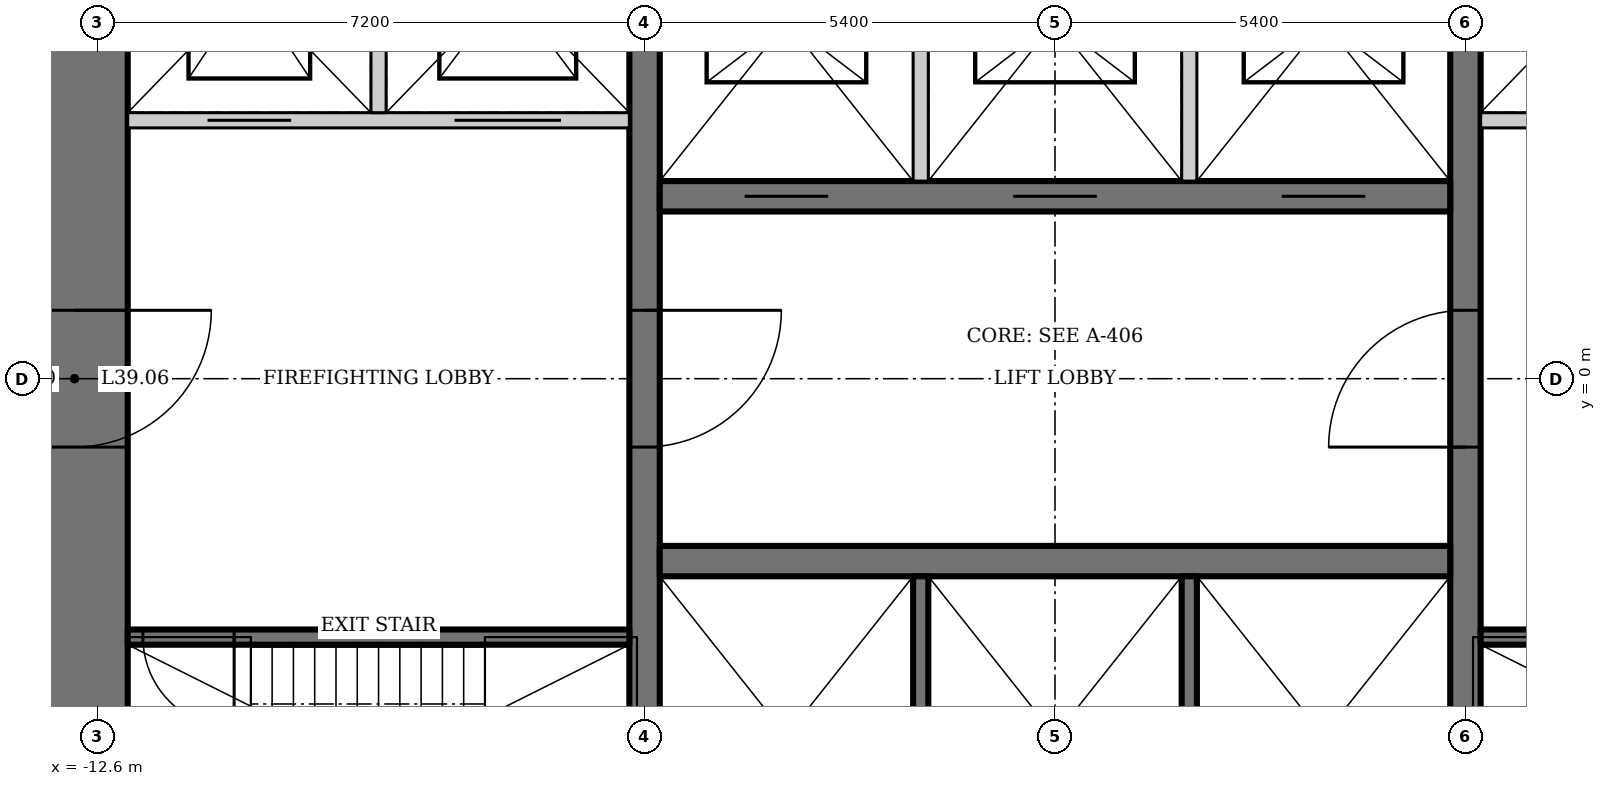
"""IFC4 building model, lengths in metres.
Left out: names, types, materials, properties, quantities, classifications, styles, units other than length and angle.
Written with IfcOpenShell. Run it as: python <this file> out.ifc"""

import sys

from ifc_helpers import new_model, si_unit, direction, frame, frame_2d, origin, place, context, subcontext, project, spatial, rectangle, extrude, element, fill, save


model = new_model("IFC4")
c1 = context("Model", 3, precision=1e-05, world=origin(), true_north=direction((0.0, 1.0)))
c2 = subcontext(c1, "Body", "Model", "MODEL_VIEW")
j1 = project(units=[si_unit("LENGTHUNIT", "METRE"), si_unit("PLANEANGLEUNIT", "RADIAN")], contexts=[c1])
p1 = place(None, origin())
s1 = spatial("IfcSite", under=j1, at=p1, CompositionType="ELEMENT")
p2 = place(p1, origin())
s2 = spatial("IfcBuilding", under=s1, at=p2, CompositionType="ELEMENT")
p3 = place(p2, frame((0.0, 0.0, 167.8)))
s3 = spatial("IfcBuildingStorey", under=s2, at=p3, CompositionType="ELEMENT", Elevation=167.8)
p4 = place(p3, frame((-12.9, 13.0, 0.0), z_axis=(0.0, 0.0, 1.0), x_axis=(0.0, -1.0, 0.0)))
e1 = element("IfcWall", 1, at=p4, inside=s3, PredefinedType="SHEAR", context=c2, shape_type="SweptSolid", body=[
    extrude(rectangle(XDim=26.0, YDim=1.4, at=frame_2d((13.0, 0.0))), origin(), (0.0, 0.0, 1.0), 4.2),
])
p5 = place(p4, frame((12.1, 0.0, 0.0)))
e2 = element("IfcOpeningElement", 2, at=p5, cuts=e1, PredefinedType="OPENING", context=c2, shape_type="SweptSolid", body=[
    extrude(rectangle(XDim=1.8, YDim=2.1, at=frame_2d((0.9, 1.05))), frame((0.0, 0.71, 0.0), z_axis=(0.0, -1.0, 0.0), x_axis=(1.0, 0.0, 0.0)), (0.0, 0.0, 1.0), 1.42),
])
p6 = place(p3, frame((5.4, -6.8, 0.0), z_axis=(0.0, 0.0, 1.0), x_axis=(0.0, 1.0, 0.0)))
e3 = element("IfcWall", 3, at=p6, inside=s3, PredefinedType="SHEAR", context=c2, shape_type="SweptSolid", body=[
    extrude(rectangle(XDim=13.6, YDim=0.4, at=frame_2d((6.8, 0.0))), origin(), (0.0, 0.0, 1.0), 4.2),
])
p7 = place(p6, frame((5.9, 0.0, 0.0)))
e4 = element("IfcOpeningElement", 4, at=p7, cuts=e3, PredefinedType="OPENING", context=c2, shape_type="SweptSolid", body=[
    extrude(rectangle(XDim=1.8, YDim=2.1, at=frame_2d((0.9, 1.05))), frame((0.0, 0.21, 0.0), z_axis=(0.0, -1.0, 0.0), x_axis=(1.0, 0.0, 0.0)), (0.0, 0.0, 1.0), 0.42),
])
p8 = place(p3, frame((-5.4, 6.8, 0.0), z_axis=(0.0, 0.0, 1.0), x_axis=(0.0, -1.0, 0.0)))
e5 = element("IfcWall", 5, at=p8, inside=s3, PredefinedType="SHEAR", context=c2, shape_type="SweptSolid", body=[
    extrude(rectangle(XDim=13.6, YDim=0.4, at=frame_2d((6.8, 0.0))), origin(), (0.0, 0.0, 1.0), 4.2),
])
p9 = place(p8, frame((5.9, 0.0, 0.0)))
e6 = element("IfcOpeningElement", 6, at=p9, cuts=e5, PredefinedType="OPENING", context=c2, shape_type="SweptSolid", body=[
    extrude(rectangle(XDim=1.8, YDim=2.1, at=frame_2d((0.9, 1.05))), frame((0.0, 0.21, 0.0), z_axis=(0.0, -1.0, 0.0), x_axis=(1.0, 0.0, 0.0)), (0.0, 0.0, 1.0), 0.42),
])
p10 = place(p3, frame((-5.2, -2.4, 0.0), z_axis=(0.0, 0.0, 1.0), x_axis=(1.0, 0.0, 0.0)))
e7 = element("IfcWall", 7, at=p10, inside=s3, PredefinedType="SHEAR", context=c2, shape_type="SweptSolid", body=[
    extrude(rectangle(XDim=10.4, YDim=0.4, at=frame_2d((5.2, 0.0))), origin(), (0.0, 0.0, 1.0), 4.2),
])
for number, where, z_axis, x_axis in (
    (8, (-1.767, -2.6, 0.0), (0.0, 0.0, 1.0), (0.0, -1.0, 0.0)),
    (9, (1.767, -2.6, 0.0), (0.0, 0.0, 1.0), (0.0, -1.0, 0.0)),
):
    element("IfcWall", number, at=place(p3, frame(where, z_axis=z_axis, x_axis=x_axis)), inside=s3, PredefinedType="SOLIDWALL", context=c2, shape_type="SweptSolid", body=[
        extrude(rectangle(XDim=4.2, YDim=0.2, at=frame_2d((2.1, 0.0))), origin(), (0.0, 0.0, 1.0), 4.2),
    ])
p11 = place(p3, frame((5.2, 2.4, 0.0), z_axis=(0.0, 0.0, 1.0), x_axis=(-1.0, 0.0, 0.0)))
e10 = element("IfcWall", 10, at=p11, inside=s3, PredefinedType="SHEAR", context=c2, shape_type="SweptSolid", body=[
    extrude(rectangle(XDim=10.4, YDim=0.4, at=frame_2d((5.2, 0.0))), origin(), (0.0, 0.0, 1.0), 4.2),
])
p12 = place(p11, frame((8.183, 0.0, 0.0)))
e11 = element("IfcOpeningElement", 11, at=p12, cuts=e10, PredefinedType="OPENING", context=c2, shape_type="SweptSolid", body=[
    extrude(rectangle(XDim=1.1, YDim=2.2, at=frame_2d((0.55, 1.1))), frame((0.0, 0.21, 0.0), z_axis=(0.0, -1.0, 0.0), x_axis=(1.0, 0.0, 0.0)), (0.0, 0.0, 1.0), 0.42),
])
p13 = place(p11, frame((4.65, 0.0, 0.0)))
e12 = element("IfcOpeningElement", 12, at=p13, cuts=e10, PredefinedType="OPENING", context=c2, shape_type="SweptSolid", body=[
    extrude(rectangle(XDim=1.1, YDim=2.2, at=frame_2d((0.55, 1.1))), frame((0.0, 0.21, 0.0), z_axis=(0.0, -1.0, 0.0), x_axis=(1.0, 0.0, 0.0)), (0.0, 0.0, 1.0), 0.42),
])
p14 = place(p11, frame((1.117, 0.0, 0.0)))
e13 = element("IfcOpeningElement", 13, at=p14, cuts=e10, PredefinedType="OPENING", context=c2, shape_type="SweptSolid", body=[
    extrude(rectangle(XDim=1.1, YDim=2.2, at=frame_2d((0.55, 1.1))), frame((0.0, 0.21, 0.0), z_axis=(0.0, -1.0, 0.0), x_axis=(1.0, 0.0, 0.0)), (0.0, 0.0, 1.0), 0.42),
])
for number, where, z_axis, x_axis in (
    (14, (-1.767, 2.6, 0.0), (0.0, 0.0, 1.0), (0.0, 1.0, 0.0)),
    (15, (1.767, 2.6, 0.0), (0.0, 0.0, 1.0), (0.0, 1.0, 0.0)),
):
    element("IfcWall", number, at=place(p3, frame(where, z_axis=z_axis, x_axis=x_axis)), inside=s3, PredefinedType="SOLIDWALL", context=c2, shape_type="SweptSolid", body=[
        extrude(rectangle(XDim=4.2, YDim=0.2, at=frame_2d((2.1, 0.0))), origin(), (0.0, 0.0, 1.0), 4.2),
    ])
p15 = place(p3, frame((5.6, -3.4, 0.0), z_axis=(0.0, 0.0, 1.0), x_axis=(1.0, 0.0, 0.0)))
e16 = element("IfcWall", 16, at=p15, inside=s3, PredefinedType="SHEAR", context=c2, shape_type="SweptSolid", body=[
    extrude(rectangle(XDim=6.6, YDim=0.2, at=frame_2d((3.3, 0.0))), origin(), (0.0, 0.0, 1.0), 4.2),
])
p16 = place(p15, frame((5.2, 0.0, 0.0)))
e17 = element("IfcOpeningElement", 17, at=p16, cuts=e16, PredefinedType="OPENING", context=c2, shape_type="SweptSolid", body=[
    extrude(rectangle(XDim=1.2, YDim=2.1, at=frame_2d((0.6, 1.05))), frame((0.0, 0.11, 0.0), z_axis=(0.0, -1.0, 0.0), x_axis=(1.0, 0.0, 0.0)), (0.0, 0.0, 1.0), 0.22),
])
p17 = place(p3, frame((12.2, 3.4, 0.0), z_axis=(0.0, 0.0, 1.0), x_axis=(-1.0, 0.0, 0.0)))
e18 = element("IfcWall", 18, at=p17, inside=s3, PredefinedType="SOLIDWALL", context=c2, shape_type="SweptSolid", body=[
    extrude(rectangle(XDim=6.6, YDim=0.2, at=frame_2d((3.3, 0.0))), origin(), (0.0, 0.0, 1.0), 4.2),
])
p18 = place(p17, frame((4.45, 0.0, 0.0)))
e19 = element("IfcOpeningElement", 19, at=p18, cuts=e18, PredefinedType="OPENING", context=c2, shape_type="SweptSolid", body=[
    extrude(rectangle(XDim=1.1, YDim=2.2, at=frame_2d((0.55, 1.1))), frame((0.0, 0.11, 0.0), z_axis=(0.0, -1.0, 0.0), x_axis=(1.0, 0.0, 0.0)), (0.0, 0.0, 1.0), 0.22),
])
p19 = place(p17, frame((0.9, 0.0, 0.0)))
e20 = element("IfcOpeningElement", 20, at=p19, cuts=e18, PredefinedType="OPENING", context=c2, shape_type="SweptSolid", body=[
    extrude(rectangle(XDim=1.4, YDim=2.2, at=frame_2d((0.7, 1.1))), frame((0.0, 0.11, 0.0), z_axis=(0.0, -1.0, 0.0), x_axis=(1.0, 0.0, 0.0)), (0.0, 0.0, 1.0), 0.22),
])
p20 = place(p3, frame((-5.6, -3.4, 0.0), z_axis=(0.0, 0.0, 1.0), x_axis=(-1.0, 0.0, 0.0)))
e21 = element("IfcWall", 21, at=p20, inside=s3, PredefinedType="SHEAR", context=c2, shape_type="SweptSolid", body=[
    extrude(rectangle(XDim=6.6, YDim=0.2, at=frame_2d((3.3, 0.0))), origin(), (0.0, 0.0, 1.0), 4.2),
])
p21 = place(p20, frame((5.2, 0.0, 0.0)))
e22 = element("IfcOpeningElement", 22, at=p21, cuts=e21, PredefinedType="OPENING", context=c2, shape_type="SweptSolid", body=[
    extrude(rectangle(XDim=1.2, YDim=2.1, at=frame_2d((0.6, 1.05))), frame((0.0, 0.11, 0.0), z_axis=(0.0, -1.0, 0.0), x_axis=(1.0, 0.0, 0.0)), (0.0, 0.0, 1.0), 0.22),
])
p22 = place(p3, frame((-12.2, 3.4, 0.0), z_axis=(0.0, 0.0, 1.0), x_axis=(1.0, 0.0, 0.0)))
e23 = element("IfcWall", 23, at=p22, inside=s3, PredefinedType="SOLIDWALL", context=c2, shape_type="SweptSolid", body=[
    extrude(rectangle(XDim=6.6, YDim=0.2, at=frame_2d((3.3, 0.0))), origin(), (0.0, 0.0, 1.0), 4.2),
])
p23 = place(p22, frame((1.05, 0.0, 0.0)))
e24 = element("IfcOpeningElement", 24, at=p23, cuts=e23, PredefinedType="OPENING", context=c2, shape_type="SweptSolid", body=[
    extrude(rectangle(XDim=1.1, YDim=2.2, at=frame_2d((0.55, 1.1))), frame((0.0, 0.11, 0.0), z_axis=(0.0, -1.0, 0.0), x_axis=(1.0, 0.0, 0.0)), (0.0, 0.0, 1.0), 0.22),
])
p24 = place(p22, frame((4.3, 0.0, 0.0)))
e25 = element("IfcOpeningElement", 25, at=p24, cuts=e23, PredefinedType="OPENING", context=c2, shape_type="SweptSolid", body=[
    extrude(rectangle(XDim=1.4, YDim=2.2, at=frame_2d((0.7, 1.1))), frame((0.0, 0.11, 0.0), z_axis=(0.0, -1.0, 0.0), x_axis=(1.0, 0.0, 0.0)), (0.0, 0.0, 1.0), 0.22),
])
p25 = place(p3, frame((-8.9, 3.5, 0.0), z_axis=(0.0, 0.0, 1.0), x_axis=(0.0, 1.0, 0.0)))
e26 = element("IfcWall", 26, at=p25, inside=s3, PredefinedType="SOLIDWALL", context=c2, shape_type="SweptSolid", body=[
    extrude(rectangle(XDim=3.3, YDim=0.2, at=frame_2d((1.65, 0.0))), origin(), (0.0, 0.0, 1.0), 4.2),
])
p26 = place(p7, origin())
e27 = element("IfcDoor", 27, at=p26, inside=s3, OperationType="DOUBLE_DOOR_DOUBLE_SWING", PredefinedType="DOOR", context=c2, shape_type="SweptSolid", body=[
    extrude(rectangle(XDim=1.8, YDim=2.1, at=frame_2d((0.9, 1.05))), frame((0.0, 0.025, 0.0), z_axis=(0.0, -1.0, 0.0), x_axis=(1.0, 0.0, 0.0)), (0.0, 0.0, 1.0), 0.05),
])
fill(e4, e27)
p27 = place(p9, origin())
e28 = element("IfcDoor", 28, at=p27, inside=s3, OperationType="DOUBLE_DOOR_DOUBLE_SWING", PredefinedType="DOOR", context=c2, shape_type="SweptSolid", body=[
    extrude(rectangle(XDim=1.8, YDim=2.1, at=frame_2d((0.9, 1.05))), frame((0.0, 0.025, 0.0), z_axis=(0.0, -1.0, 0.0), x_axis=(1.0, 0.0, 0.0)), (0.0, 0.0, 1.0), 0.05),
])
fill(e6, e28)
p28 = place(p21, origin())
e29 = element("IfcDoor", 29, at=p28, inside=s3, OperationType="SINGLE_SWING_RIGHT", PredefinedType="DOOR", context=c2, shape_type="SweptSolid", body=[
    extrude(rectangle(XDim=1.2, YDim=2.1, at=frame_2d((0.6, 1.05))), frame((0.0, 0.025, 0.0), z_axis=(0.0, -1.0, 0.0), x_axis=(1.0, 0.0, 0.0)), (0.0, 0.0, 1.0), 0.05),
])
fill(e22, e29)
p29 = place(p5, origin())
e30 = element("IfcDoor", 30, at=p29, inside=s3, OperationType="DOUBLE_DOOR_DOUBLE_SWING", PredefinedType="DOOR", context=c2, shape_type="SweptSolid", body=[
    extrude(rectangle(XDim=1.8, YDim=2.1, at=frame_2d((0.9, 1.05))), frame((0.0, 0.025, 0.0), z_axis=(0.0, -1.0, 0.0), x_axis=(1.0, 0.0, 0.0)), (0.0, 0.0, 1.0), 0.05),
])
fill(e2, e30)
p30 = place(p12, origin())
e31 = element("IfcDoor", 31, at=p30, inside=s3, OperationType="DOUBLE_DOOR_SLIDING", PredefinedType="DOOR", context=c2, shape_type="SweptSolid", body=[
    extrude(rectangle(XDim=1.1, YDim=2.2, at=frame_2d((0.55, 1.1))), frame((0.0, 0.025, 0.0), z_axis=(0.0, -1.0, 0.0), x_axis=(1.0, 0.0, 0.0)), (0.0, 0.0, 1.0), 0.05),
])
fill(e11, e31)
p31 = place(p13, origin())
e32 = element("IfcDoor", 32, at=p31, inside=s3, OperationType="DOUBLE_DOOR_SLIDING", PredefinedType="DOOR", context=c2, shape_type="SweptSolid", body=[
    extrude(rectangle(XDim=1.1, YDim=2.2, at=frame_2d((0.55, 1.1))), frame((0.0, 0.025, 0.0), z_axis=(0.0, -1.0, 0.0), x_axis=(1.0, 0.0, 0.0)), (0.0, 0.0, 1.0), 0.05),
])
fill(e12, e32)
p32 = place(p14, origin())
e33 = element("IfcDoor", 33, at=p32, inside=s3, OperationType="DOUBLE_DOOR_SLIDING", PredefinedType="DOOR", context=c2, shape_type="SweptSolid", body=[
    extrude(rectangle(XDim=1.1, YDim=2.2, at=frame_2d((0.55, 1.1))), frame((0.0, 0.025, 0.0), z_axis=(0.0, -1.0, 0.0), x_axis=(1.0, 0.0, 0.0)), (0.0, 0.0, 1.0), 0.05),
])
fill(e13, e33)
p33 = place(p23, origin())
e34 = element("IfcDoor", 34, at=p33, inside=s3, OperationType="DOUBLE_DOOR_SLIDING", PredefinedType="DOOR", context=c2, shape_type="SweptSolid", body=[
    extrude(rectangle(XDim=1.1, YDim=2.2, at=frame_2d((0.55, 1.1))), frame((0.0, 0.025, 0.0), z_axis=(0.0, -1.0, 0.0), x_axis=(1.0, 0.0, 0.0)), (0.0, 0.0, 1.0), 0.05),
])
fill(e24, e34)
p34 = place(p24, origin())
e35 = element("IfcDoor", 35, at=p34, inside=s3, OperationType="DOUBLE_DOOR_SLIDING", PredefinedType="DOOR", context=c2, shape_type="SweptSolid", body=[
    extrude(rectangle(XDim=1.4, YDim=2.2, at=frame_2d((0.7, 1.1))), frame((0.0, 0.025, 0.0), z_axis=(0.0, -1.0, 0.0), x_axis=(1.0, 0.0, 0.0)), (0.0, 0.0, 1.0), 0.05),
])
fill(e25, e35)
save(model, sys.argv[1])
